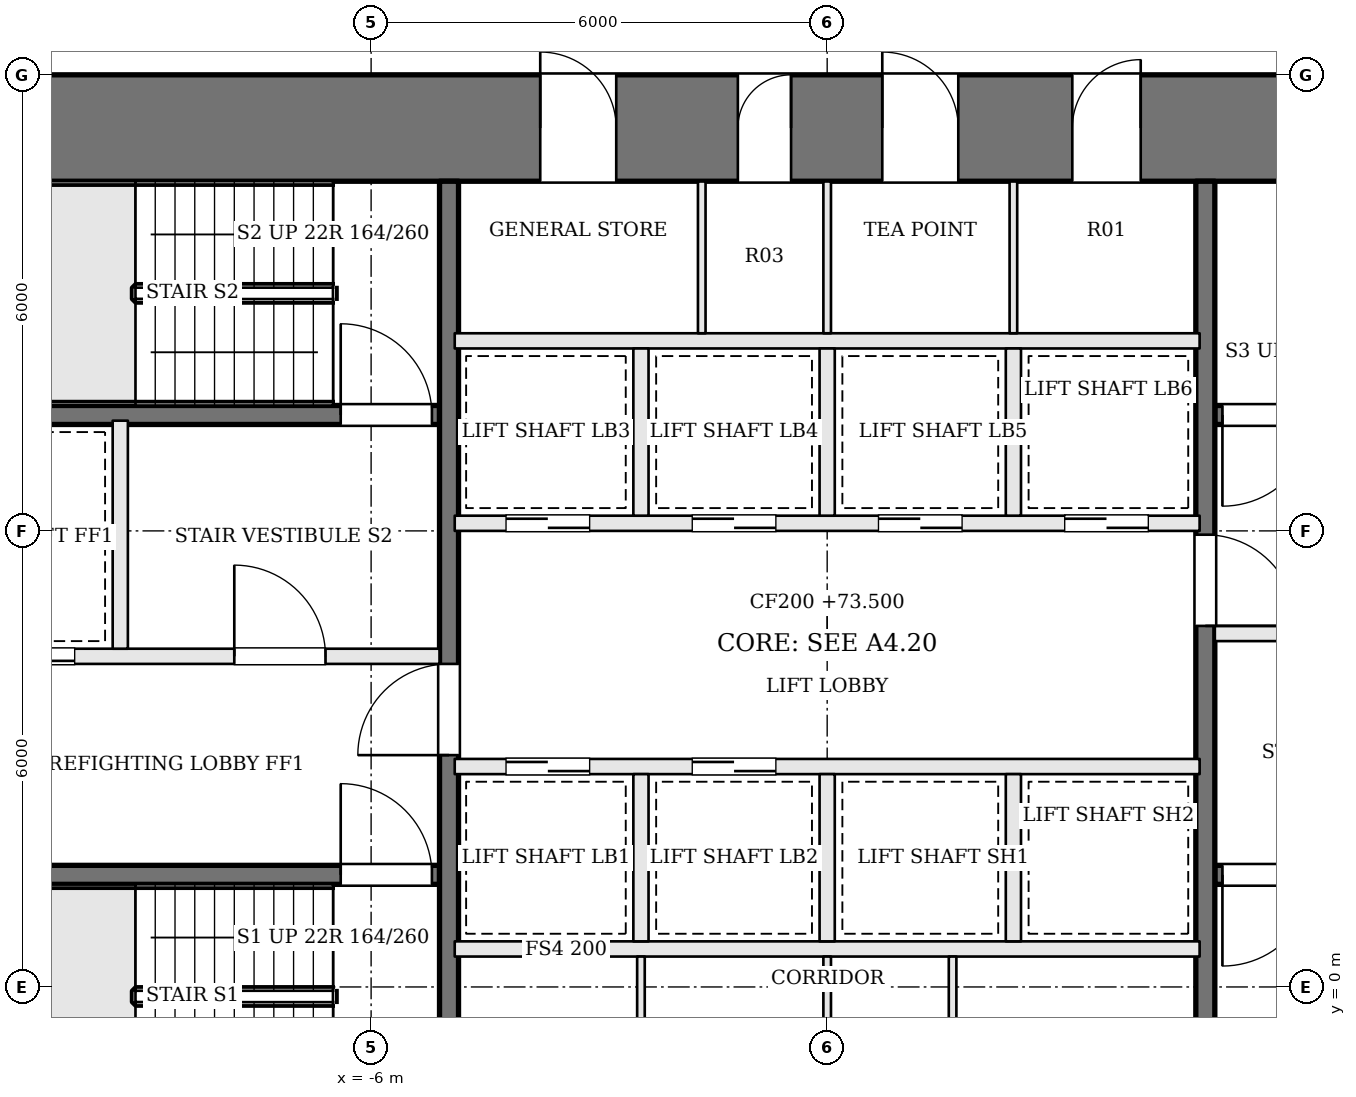
"""IFC4 building model, lengths in metres.
Left out: names, types, materials, properties, quantities, classifications, styles, units other than length and angle.
Written with IfcOpenShell. Run it as: python <this file> out.ifc"""

import sys

from ifc_helpers import new_model, si_unit, direction, frame, frame_2d, origin, place, context, subcontext, project, spatial, rectangle, extrude, element, fill, save


model = new_model("IFC4")
c1 = context("Model", 3, precision=1e-05, world=origin(), true_north=direction((0.0, 1.0)))
c2 = subcontext(c1, "Body", "Model", "MODEL_VIEW")
j1 = project(units=[si_unit("LENGTHUNIT", "METRE"), si_unit("PLANEANGLEUNIT", "RADIAN")], contexts=[c1])
p1 = place(None, origin())
s1 = spatial("IfcSite", under=j1, at=p1, CompositionType="ELEMENT")
p2 = place(p1, origin())
s2 = spatial("IfcBuilding", under=s1, at=p2, CompositionType="ELEMENT")
p3 = place(p2, frame((0.0, 0.0, 73.5)))
s3 = spatial("IfcBuildingStorey", under=s2, at=p3, CompositionType="ELEMENT", Elevation=73.5)
p4 = place(p3, frame((-13.0, 11.3, 0.0), z_axis=(0.0, 0.0, 1.0), x_axis=(1.0, 0.0, 0.0)))
e1 = element("IfcWall", 1, at=p4, inside=s3, PredefinedType="SHEAR", context=c2, shape_type="SweptSolid", body=[
    extrude(rectangle(XDim=26.0, YDim=1.4, at=frame_2d((13.0, 0.0))), origin(), (0.0, 0.0, 1.0), 3.6),
])
p5 = place(p4, frame((9.225, 0.0, 0.0)))
e2 = element("IfcOpeningElement", 2, at=p5, cuts=e1, PredefinedType="OPENING", context=c2, shape_type="SweptSolid", body=[
    extrude(rectangle(XDim=1.0, YDim=2.1, at=frame_2d((0.5, 1.05))), frame((0.0, 0.71, 0.0), z_axis=(0.0, -1.0, 0.0), x_axis=(1.0, 0.0, 0.0)), (0.0, 0.0, 1.0), 1.42),
])
p6 = place(p4, frame((11.825, 0.0, 0.0)))
e3 = element("IfcOpeningElement", 3, at=p6, cuts=e1, PredefinedType="OPENING", context=c2, shape_type="SweptSolid", body=[
    extrude(rectangle(XDim=0.7, YDim=2.1, at=frame_2d((0.35, 1.05))), frame((0.0, 0.71, 0.0), z_axis=(0.0, -1.0, 0.0), x_axis=(1.0, 0.0, 0.0)), (0.0, 0.0, 1.0), 1.42),
])
p7 = place(p4, frame((13.725, 0.0, 0.0)))
e4 = element("IfcOpeningElement", 4, at=p7, cuts=e1, PredefinedType="OPENING", context=c2, shape_type="SweptSolid", body=[
    extrude(rectangle(XDim=1.0, YDim=2.1, at=frame_2d((0.5, 1.05))), frame((0.0, 0.71, 0.0), z_axis=(0.0, -1.0, 0.0), x_axis=(1.0, 0.0, 0.0)), (0.0, 0.0, 1.0), 1.42),
])
p8 = place(p4, frame((16.225, 0.0, 0.0)))
e5 = element("IfcOpeningElement", 5, at=p8, cuts=e1, PredefinedType="OPENING", context=c2, shape_type="SweptSolid", body=[
    extrude(rectangle(XDim=0.9, YDim=2.1, at=frame_2d((0.45, 1.05))), frame((0.0, 0.71, 0.0), z_axis=(0.0, -1.0, 0.0), x_axis=(1.0, 0.0, 0.0)), (0.0, 0.0, 1.0), 1.42),
])
p9 = place(p3, frame((-11.6, 1.475, 0.0), z_axis=(0.0, 0.0, 1.0), x_axis=(1.0, 0.0, 0.0)))
e6 = element("IfcWall", 6, at=p9, inside=s3, PredefinedType="SOLIDWALL", context=c2, shape_type="SweptSolid", body=[
    extrude(rectangle(XDim=6.5, YDim=0.25, at=frame_2d((3.25, 0.0))), origin(), (0.0, 0.0, 1.0), 3.3),
])
p10 = place(p9, frame((5.2, 0.0, 0.0)))
e7 = element("IfcOpeningElement", 7, at=p10, cuts=e6, PredefinedType="OPENING", context=c2, shape_type="SweptSolid", body=[
    extrude(rectangle(XDim=1.2, YDim=2.1, at=frame_2d((0.6, 1.05))), frame((0.0, 0.135, 0.0), z_axis=(0.0, -1.0, 0.0), x_axis=(1.0, 0.0, 0.0)), (0.0, 0.0, 1.0), 0.27),
])
p11 = place(p3, frame((11.6, 7.525, 0.0), z_axis=(0.0, 0.0, 1.0), x_axis=(-1.0, 0.0, 0.0)))
e8 = element("IfcWall", 8, at=p11, inside=s3, PredefinedType="SOLIDWALL", context=c2, shape_type="SweptSolid", body=[
    extrude(rectangle(XDim=6.5, YDim=0.25, at=frame_2d((3.25, 0.0))), origin(), (0.0, 0.0, 1.0), 3.3),
])
p12 = place(p11, frame((5.2, 0.0, 0.0)))
e9 = element("IfcOpeningElement", 9, at=p12, cuts=e8, PredefinedType="OPENING", context=c2, shape_type="SweptSolid", body=[
    extrude(rectangle(XDim=1.2, YDim=2.1, at=frame_2d((0.6, 1.05))), frame((0.0, 0.135, 0.0), z_axis=(0.0, -1.0, 0.0), x_axis=(1.0, 0.0, 0.0)), (0.0, 0.0, 1.0), 0.27),
])
p13 = place(p3, frame((-11.6, 4.35, 0.0), z_axis=(0.0, 0.0, 1.0), x_axis=(1.0, 0.0, 0.0)))
e10 = element("IfcWall", 10, at=p13, inside=s3, PredefinedType="SOLIDWALL", context=c2, shape_type="SweptSolid", body=[
    extrude(rectangle(XDim=6.5, YDim=0.2, at=frame_2d((3.25, 0.0))), origin(), (0.0, 0.0, 1.0), 3.3),
])
p14 = place(p13, frame((3.8, 0.0, 0.0)))
e11 = element("IfcOpeningElement", 11, at=p14, cuts=e10, PredefinedType="OPENING", context=c2, shape_type="SweptSolid", body=[
    extrude(rectangle(XDim=1.2, YDim=2.1, at=frame_2d((0.6, 1.05))), frame((0.0, 0.11, 0.0), z_axis=(0.0, -1.0, 0.0), x_axis=(1.0, 0.0, 0.0)), (0.0, 0.0, 1.0), 0.22),
])
p15 = place(p13, frame((0.5, 0.0, 0.0)))
e12 = element("IfcOpeningElement", 12, at=p15, cuts=e10, PredefinedType="OPENING", context=c2, shape_type="SweptSolid", body=[
    extrude(rectangle(XDim=1.2, YDim=2.1, at=frame_2d((0.6, 1.05))), frame((0.0, 0.11, 0.0), z_axis=(0.0, -1.0, 0.0), x_axis=(1.0, 0.0, 0.0)), (0.0, 0.0, 1.0), 0.22),
])
p16 = place(p3, frame((11.6, 4.65, 0.0), z_axis=(0.0, 0.0, 1.0), x_axis=(-1.0, 0.0, 0.0)))
e13 = element("IfcWall", 13, at=p16, inside=s3, PredefinedType="SOLIDWALL", context=c2, shape_type="SweptSolid", body=[
    extrude(rectangle(XDim=6.5, YDim=0.2, at=frame_2d((3.25, 0.0))), origin(), (0.0, 0.0, 1.0), 3.3),
])
p17 = place(p16, frame((3.8, 0.0, 0.0)))
e14 = element("IfcOpeningElement", 14, at=p17, cuts=e13, PredefinedType="OPENING", context=c2, shape_type="SweptSolid", body=[
    extrude(rectangle(XDim=1.2, YDim=2.1, at=frame_2d((0.6, 1.05))), frame((0.0, 0.11, 0.0), z_axis=(0.0, -1.0, 0.0), x_axis=(1.0, 0.0, 0.0)), (0.0, 0.0, 1.0), 0.22),
])
p18 = place(p16, frame((0.5, 0.0, 0.0)))
e15 = element("IfcOpeningElement", 15, at=p18, cuts=e13, PredefinedType="OPENING", context=c2, shape_type="SweptSolid", body=[
    extrude(rectangle(XDim=1.2, YDim=2.1, at=frame_2d((0.6, 1.05))), frame((0.0, 0.11, 0.0), z_axis=(0.0, -1.0, 0.0), x_axis=(1.0, 0.0, 0.0)), (0.0, 0.0, 1.0), 0.22),
])
p19 = place(p3, frame((-11.6, 7.525, 0.0), z_axis=(0.0, 0.0, 1.0), x_axis=(1.0, 0.0, 0.0)))
e16 = element("IfcWall", 16, at=p19, inside=s3, PredefinedType="SOLIDWALL", context=c2, shape_type="SweptSolid", body=[
    extrude(rectangle(XDim=6.5, YDim=0.25, at=frame_2d((3.25, 0.0))), origin(), (0.0, 0.0, 1.0), 3.3),
])
p20 = place(p19, frame((5.2, 0.0, 0.0)))
e17 = element("IfcOpeningElement", 17, at=p20, cuts=e16, PredefinedType="OPENING", context=c2, shape_type="SweptSolid", body=[
    extrude(rectangle(XDim=1.2, YDim=2.1, at=frame_2d((0.6, 1.05))), frame((0.0, 0.135, 0.0), z_axis=(0.0, -1.0, 0.0), x_axis=(1.0, 0.0, 0.0)), (0.0, 0.0, 1.0), 0.27),
])
p21 = place(p3, frame((11.6, 1.475, 0.0), z_axis=(0.0, 0.0, 1.0), x_axis=(-1.0, 0.0, 0.0)))
e18 = element("IfcWall", 18, at=p21, inside=s3, PredefinedType="SOLIDWALL", context=c2, shape_type="SweptSolid", body=[
    extrude(rectangle(XDim=6.5, YDim=0.25, at=frame_2d((3.25, 0.0))), origin(), (0.0, 0.0, 1.0), 3.3),
])
p22 = place(p21, frame((5.2, 0.0, 0.0)))
e19 = element("IfcOpeningElement", 19, at=p22, cuts=e18, PredefinedType="OPENING", context=c2, shape_type="SweptSolid", body=[
    extrude(rectangle(XDim=1.2, YDim=2.1, at=frame_2d((0.6, 1.05))), frame((0.0, 0.135, 0.0), z_axis=(0.0, -1.0, 0.0), x_axis=(1.0, 0.0, 0.0)), (0.0, 0.0, 1.0), 0.27),
])
p23 = place(p3, frame((-9.3, 4.45, 0.0), z_axis=(0.0, 0.0, 1.0), x_axis=(0.0, 1.0, 0.0)))
e20 = element("IfcWall", 20, at=p23, inside=s3, PredefinedType="SOLIDWALL", context=c2, shape_type="SweptSolid", body=[
    extrude(rectangle(XDim=3.0, YDim=0.2, at=frame_2d((1.5, 0.0))), origin(), (0.0, 0.0, 1.0), 3.3),
])
p24 = place(p3, frame((-4.975, -1.6, 0.0), z_axis=(0.0, 0.0, 1.0), x_axis=(0.0, 1.0, 0.0)))
e21 = element("IfcWall", 21, at=p24, inside=s3, PredefinedType="SOLIDWALL", context=c2, shape_type="SweptSolid", body=[
    extrude(rectangle(XDim=12.2, YDim=0.25, at=frame_2d((6.1, 0.0))), origin(), (0.0, 0.0, 1.0), 3.3),
])
p25 = place(p24, frame((4.65, 0.0, 0.0)))
e22 = element("IfcOpeningElement", 22, at=p25, cuts=e21, PredefinedType="OPENING", context=c2, shape_type="SweptSolid", body=[
    extrude(rectangle(XDim=1.2, YDim=2.1, at=frame_2d((0.6, 1.05))), frame((0.0, 0.135, 0.0), z_axis=(0.0, -1.0, 0.0), x_axis=(1.0, 0.0, 0.0)), (0.0, 0.0, 1.0), 0.27),
])
p26 = place(p3, frame((4.975, 10.6, 0.0), z_axis=(0.0, 0.0, 1.0), x_axis=(0.0, -1.0, 0.0)))
e23 = element("IfcWall", 23, at=p26, inside=s3, PredefinedType="SOLIDWALL", context=c2, shape_type="SweptSolid", body=[
    extrude(rectangle(XDim=12.2, YDim=0.25, at=frame_2d((6.1, 0.0))), origin(), (0.0, 0.0, 1.0), 3.3),
])
p27 = place(p26, frame((4.65, 0.0, 0.0)))
e24 = element("IfcOpeningElement", 24, at=p27, cuts=e23, PredefinedType="OPENING", context=c2, shape_type="SweptSolid", body=[
    extrude(rectangle(XDim=1.2, YDim=2.1, at=frame_2d((0.6, 1.05))), frame((0.0, 0.135, 0.0), z_axis=(0.0, -1.0, 0.0), x_axis=(1.0, 0.0, 0.0)), (0.0, 0.0, 1.0), 0.27),
])
p28 = place(p3, frame((-4.9, 0.5, 0.0), z_axis=(0.0, 0.0, 1.0), x_axis=(1.0, 0.0, 0.0)))
e25 = element("IfcWall", 25, at=p28, inside=s3, PredefinedType="SOLIDWALL", context=c2, shape_type="SweptSolid", body=[
    extrude(rectangle(XDim=9.8, YDim=0.2, at=frame_2d((4.9, 0.0))), origin(), (0.0, 0.0, 1.0), 3.3),
])
p29 = place(p3, frame((-4.9, 2.9, 0.0), z_axis=(0.0, 0.0, 1.0), x_axis=(1.0, 0.0, 0.0)))
e26 = element("IfcWall", 26, at=p29, inside=s3, PredefinedType="SOLIDWALL", context=c2, shape_type="SweptSolid", body=[
    extrude(rectangle(XDim=9.8, YDim=0.2, at=frame_2d((4.9, 0.0))), origin(), (0.0, 0.0, 1.0), 3.3),
])
p30 = place(p29, frame((0.675, 0.0, 0.0)))
e27 = element("IfcOpeningElement", 27, at=p30, cuts=e26, PredefinedType="OPENING", context=c2, shape_type="SweptSolid", body=[
    extrude(rectangle(XDim=1.1, YDim=2.1, at=frame_2d((0.55, 1.05))), frame((0.0, 0.11, 0.0), z_axis=(0.0, -1.0, 0.0), x_axis=(1.0, 0.0, 0.0)), (0.0, 0.0, 1.0), 0.22),
])
p31 = place(p29, frame((3.125, 0.0, 0.0)))
e28 = element("IfcOpeningElement", 28, at=p31, cuts=e26, PredefinedType="OPENING", context=c2, shape_type="SweptSolid", body=[
    extrude(rectangle(XDim=1.1, YDim=2.1, at=frame_2d((0.55, 1.05))), frame((0.0, 0.11, 0.0), z_axis=(0.0, -1.0, 0.0), x_axis=(1.0, 0.0, 0.0)), (0.0, 0.0, 1.0), 0.22),
])
p32 = place(p3, frame((-4.9, 6.1, 0.0), z_axis=(0.0, 0.0, 1.0), x_axis=(1.0, 0.0, 0.0)))
e29 = element("IfcWall", 29, at=p32, inside=s3, PredefinedType="SOLIDWALL", context=c2, shape_type="SweptSolid", body=[
    extrude(rectangle(XDim=9.8, YDim=0.2, at=frame_2d((4.9, 0.0))), origin(), (0.0, 0.0, 1.0), 3.3),
])
p33 = place(p32, frame((0.675, 0.0, 0.0)))
e30 = element("IfcOpeningElement", 30, at=p33, cuts=e29, PredefinedType="OPENING", context=c2, shape_type="SweptSolid", body=[
    extrude(rectangle(XDim=1.1, YDim=2.1, at=frame_2d((0.55, 1.05))), frame((0.0, 0.11, 0.0), z_axis=(0.0, -1.0, 0.0), x_axis=(1.0, 0.0, 0.0)), (0.0, 0.0, 1.0), 0.22),
])
p34 = place(p32, frame((3.125, 0.0, 0.0)))
e31 = element("IfcOpeningElement", 31, at=p34, cuts=e29, PredefinedType="OPENING", context=c2, shape_type="SweptSolid", body=[
    extrude(rectangle(XDim=1.1, YDim=2.1, at=frame_2d((0.55, 1.05))), frame((0.0, 0.11, 0.0), z_axis=(0.0, -1.0, 0.0), x_axis=(1.0, 0.0, 0.0)), (0.0, 0.0, 1.0), 0.22),
])
p35 = place(p32, frame((5.575, 0.0, 0.0)))
e32 = element("IfcOpeningElement", 32, at=p35, cuts=e29, PredefinedType="OPENING", context=c2, shape_type="SweptSolid", body=[
    extrude(rectangle(XDim=1.1, YDim=2.1, at=frame_2d((0.55, 1.05))), frame((0.0, 0.11, 0.0), z_axis=(0.0, -1.0, 0.0), x_axis=(1.0, 0.0, 0.0)), (0.0, 0.0, 1.0), 0.22),
])
p36 = place(p32, frame((8.025, 0.0, 0.0)))
e33 = element("IfcOpeningElement", 33, at=p36, cuts=e29, PredefinedType="OPENING", context=c2, shape_type="SweptSolid", body=[
    extrude(rectangle(XDim=1.1, YDim=2.1, at=frame_2d((0.55, 1.05))), frame((0.0, 0.11, 0.0), z_axis=(0.0, -1.0, 0.0), x_axis=(1.0, 0.0, 0.0)), (0.0, 0.0, 1.0), 0.22),
])
p37 = place(p3, frame((-4.9, 8.5, 0.0), z_axis=(0.0, 0.0, 1.0), x_axis=(1.0, 0.0, 0.0)))
e34 = element("IfcWall", 34, at=p37, inside=s3, PredefinedType="SOLIDWALL", context=c2, shape_type="SweptSolid", body=[
    extrude(rectangle(XDim=9.8, YDim=0.2, at=frame_2d((4.9, 0.0))), origin(), (0.0, 0.0, 1.0), 3.3),
])
for number, where, z_axis, x_axis in (
    (35, (-2.45, 0.6, 0.0), (0.0, 0.0, 1.0), (0.0, 1.0, 0.0)),
    (36, (0.0, 0.6, 0.0), (0.0, 0.0, 1.0), (0.0, 1.0, 0.0)),
    (37, (2.45, 0.6, 0.0), (0.0, 0.0, 1.0), (0.0, 1.0, 0.0)),
    (38, (-2.45, 6.2, 0.0), (0.0, 0.0, 1.0), (0.0, 1.0, 0.0)),
    (39, (0.0, 6.2, 0.0), (0.0, 0.0, 1.0), (0.0, 1.0, 0.0)),
    (40, (2.45, 6.2, 0.0), (0.0, 0.0, 1.0), (0.0, 1.0, 0.0)),
):
    element("IfcWall", number, at=place(p3, frame(where, z_axis=z_axis, x_axis=x_axis)), inside=s3, PredefinedType="SOLIDWALL", context=c2, shape_type="SweptSolid", body=[
        extrude(rectangle(XDim=2.2, YDim=0.2, at=frame_2d((1.1, 0.0))), origin(), (0.0, 0.0, 1.0), 3.3),
    ])
for number, where, z_axis, x_axis in (
    (41, (-2.45, -1.6, 0.0), (0.0, 0.0, 1.0), (0.0, 1.0, 0.0)),
    (42, (0.0, -1.6, 0.0), (0.0, 0.0, 1.0), (0.0, 1.0, 0.0)),
    (43, (1.65, -1.6, 0.0), (0.0, 0.0, 1.0), (0.0, 1.0, 0.0)),
    (44, (-1.65, 8.6, 0.0), (0.0, 0.0, 1.0), (0.0, 1.0, 0.0)),
    (45, (0.0, 8.6, 0.0), (0.0, 0.0, 1.0), (0.0, 1.0, 0.0)),
    (46, (2.45, 8.6, 0.0), (0.0, 0.0, 1.0), (0.0, 1.0, 0.0)),
):
    element("IfcWall", number, at=place(p3, frame(where, z_axis=z_axis, x_axis=x_axis)), inside=s3, PredefinedType="PARTITIONING", context=c2, shape_type="SweptSolid", body=[
        extrude(rectangle(XDim=2.0, YDim=0.1, at=frame_2d((1.0, 0.0))), origin(), (0.0, 0.0, 1.0), 3.3),
    ])
p38 = place(p25, origin())
e47 = element("IfcDoor", 47, at=p38, inside=s3, OperationType="SINGLE_SWING_LEFT", PredefinedType="DOOR", context=c2, shape_type="SweptSolid", body=[
    extrude(rectangle(XDim=1.2, YDim=2.1, at=frame_2d((0.6, 1.05))), frame((0.0, 0.025, 0.0), z_axis=(0.0, -1.0, 0.0), x_axis=(1.0, 0.0, 0.0)), (0.0, 0.0, 1.0), 0.05),
])
fill(e22, e47)
p39 = place(p27, origin())
e48 = element("IfcDoor", 48, at=p39, inside=s3, OperationType="SINGLE_SWING_RIGHT", PredefinedType="DOOR", context=c2, shape_type="SweptSolid", body=[
    extrude(rectangle(XDim=1.2, YDim=2.1, at=frame_2d((0.6, 1.05))), frame((0.0, 0.025, 0.0), z_axis=(0.0, -1.0, 0.0), x_axis=(1.0, 0.0, 0.0)), (0.0, 0.0, 1.0), 0.05),
])
fill(e24, e48)
p40 = place(p14, origin())
e49 = element("IfcDoor", 49, at=p40, inside=s3, OperationType="SINGLE_SWING_LEFT", PredefinedType="DOOR", context=c2, shape_type="SweptSolid", body=[
    extrude(rectangle(XDim=1.2, YDim=2.1, at=frame_2d((0.6, 1.05))), frame((0.0, 0.025, 0.0), z_axis=(0.0, -1.0, 0.0), x_axis=(1.0, 0.0, 0.0)), (0.0, 0.0, 1.0), 0.05),
])
fill(e11, e49)
p41 = place(p10, origin())
e50 = element("IfcDoor", 50, at=p41, inside=s3, OperationType="SINGLE_SWING_LEFT", PredefinedType="DOOR", context=c2, shape_type="SweptSolid", body=[
    extrude(rectangle(XDim=1.2, YDim=2.1, at=frame_2d((0.6, 1.05))), frame((0.0, 0.025, 0.0), z_axis=(0.0, -1.0, 0.0), x_axis=(1.0, 0.0, 0.0)), (0.0, 0.0, 1.0), 0.05),
])
fill(e7, e50)
p42 = place(p12, origin())
e51 = element("IfcDoor", 51, at=p42, inside=s3, OperationType="SINGLE_SWING_RIGHT", PredefinedType="DOOR", context=c2, shape_type="SweptSolid", body=[
    extrude(rectangle(XDim=1.2, YDim=2.1, at=frame_2d((0.6, 1.05))), frame((0.0, 0.025, 0.0), z_axis=(0.0, -1.0, 0.0), x_axis=(1.0, 0.0, 0.0)), (0.0, 0.0, 1.0), 0.05),
])
fill(e9, e51)
p43 = place(p20, origin())
e52 = element("IfcDoor", 52, at=p43, inside=s3, OperationType="SINGLE_SWING_LEFT", PredefinedType="DOOR", context=c2, shape_type="SweptSolid", body=[
    extrude(rectangle(XDim=1.2, YDim=2.1, at=frame_2d((0.6, 1.05))), frame((0.0, 0.025, 0.0), z_axis=(0.0, -1.0, 0.0), x_axis=(1.0, 0.0, 0.0)), (0.0, 0.0, 1.0), 0.05),
])
fill(e17, e52)
p44 = place(p22, origin())
e53 = element("IfcDoor", 53, at=p44, inside=s3, OperationType="SINGLE_SWING_RIGHT", PredefinedType="DOOR", context=c2, shape_type="SweptSolid", body=[
    extrude(rectangle(XDim=1.2, YDim=2.1, at=frame_2d((0.6, 1.05))), frame((0.0, 0.025, 0.0), z_axis=(0.0, -1.0, 0.0), x_axis=(1.0, 0.0, 0.0)), (0.0, 0.0, 1.0), 0.05),
])
fill(e19, e53)
p45 = place(p15, origin())
e54 = element("IfcDoor", 54, at=p45, inside=s3, OperationType="SLIDING_TO_RIGHT", PredefinedType="DOOR", context=c2, shape_type="SweptSolid", body=[
    extrude(rectangle(XDim=1.2, YDim=2.1, at=frame_2d((0.6, 1.05))), frame((0.0, 0.025, 0.0), z_axis=(0.0, -1.0, 0.0), x_axis=(1.0, 0.0, 0.0)), (0.0, 0.0, 1.0), 0.05),
])
fill(e12, e54)
p46 = place(p30, origin())
e55 = element("IfcDoor", 55, at=p46, inside=s3, OperationType="SLIDING_TO_RIGHT", PredefinedType="DOOR", context=c2, shape_type="SweptSolid", body=[
    extrude(rectangle(XDim=1.1, YDim=2.1, at=frame_2d((0.55, 1.05))), frame((0.0, 0.025, 0.0), z_axis=(0.0, -1.0, 0.0), x_axis=(1.0, 0.0, 0.0)), (0.0, 0.0, 1.0), 0.05),
])
fill(e27, e55)
p47 = place(p31, origin())
e56 = element("IfcDoor", 56, at=p47, inside=s3, OperationType="SLIDING_TO_LEFT", PredefinedType="DOOR", context=c2, shape_type="SweptSolid", body=[
    extrude(rectangle(XDim=1.1, YDim=2.1, at=frame_2d((0.55, 1.05))), frame((0.0, 0.025, 0.0), z_axis=(0.0, -1.0, 0.0), x_axis=(1.0, 0.0, 0.0)), (0.0, 0.0, 1.0), 0.05),
])
fill(e28, e56)
p48 = place(p33, origin())
e57 = element("IfcDoor", 57, at=p48, inside=s3, OperationType="SLIDING_TO_RIGHT", PredefinedType="DOOR", context=c2, shape_type="SweptSolid", body=[
    extrude(rectangle(XDim=1.1, YDim=2.1, at=frame_2d((0.55, 1.05))), frame((0.0, 0.025, 0.0), z_axis=(0.0, -1.0, 0.0), x_axis=(1.0, 0.0, 0.0)), (0.0, 0.0, 1.0), 0.05),
])
fill(e30, e57)
p49 = place(p34, origin())
e58 = element("IfcDoor", 58, at=p49, inside=s3, OperationType="SLIDING_TO_LEFT", PredefinedType="DOOR", context=c2, shape_type="SweptSolid", body=[
    extrude(rectangle(XDim=1.1, YDim=2.1, at=frame_2d((0.55, 1.05))), frame((0.0, 0.025, 0.0), z_axis=(0.0, -1.0, 0.0), x_axis=(1.0, 0.0, 0.0)), (0.0, 0.0, 1.0), 0.05),
])
fill(e31, e58)
p50 = place(p35, origin())
e59 = element("IfcDoor", 59, at=p50, inside=s3, OperationType="SLIDING_TO_RIGHT", PredefinedType="DOOR", context=c2, shape_type="SweptSolid", body=[
    extrude(rectangle(XDim=1.1, YDim=2.1, at=frame_2d((0.55, 1.05))), frame((0.0, 0.025, 0.0), z_axis=(0.0, -1.0, 0.0), x_axis=(1.0, 0.0, 0.0)), (0.0, 0.0, 1.0), 0.05),
])
fill(e32, e59)
p51 = place(p36, origin())
e60 = element("IfcDoor", 60, at=p51, inside=s3, OperationType="SLIDING_TO_LEFT", PredefinedType="DOOR", context=c2, shape_type="SweptSolid", body=[
    extrude(rectangle(XDim=1.1, YDim=2.1, at=frame_2d((0.55, 1.05))), frame((0.0, 0.025, 0.0), z_axis=(0.0, -1.0, 0.0), x_axis=(1.0, 0.0, 0.0)), (0.0, 0.0, 1.0), 0.05),
])
fill(e33, e60)
p52 = place(p5, origin())
e61 = element("IfcDoor", 61, at=p52, inside=s3, OperationType="SINGLE_SWING_LEFT", PredefinedType="DOOR", context=c2, shape_type="SweptSolid", body=[
    extrude(rectangle(XDim=1.0, YDim=2.1, at=frame_2d((0.5, 1.05))), frame((0.0, 0.025, 0.0), z_axis=(0.0, -1.0, 0.0), x_axis=(1.0, 0.0, 0.0)), (0.0, 0.0, 1.0), 0.05),
])
fill(e2, e61)
p53 = place(p6, origin())
e62 = element("IfcDoor", 62, at=p53, inside=s3, OperationType="SINGLE_SWING_RIGHT", PredefinedType="DOOR", context=c2, shape_type="SweptSolid", body=[
    extrude(rectangle(XDim=0.7, YDim=2.1, at=frame_2d((0.35, 1.05))), frame((0.0, 0.025, 0.0), z_axis=(0.0, -1.0, 0.0), x_axis=(1.0, 0.0, 0.0)), (0.0, 0.0, 1.0), 0.05),
])
fill(e3, e62)
p54 = place(p7, origin())
e63 = element("IfcDoor", 63, at=p54, inside=s3, OperationType="SINGLE_SWING_LEFT", PredefinedType="DOOR", context=c2, shape_type="SweptSolid", body=[
    extrude(rectangle(XDim=1.0, YDim=2.1, at=frame_2d((0.5, 1.05))), frame((0.0, 0.025, 0.0), z_axis=(0.0, -1.0, 0.0), x_axis=(1.0, 0.0, 0.0)), (0.0, 0.0, 1.0), 0.05),
])
fill(e4, e63)
p55 = place(p8, origin())
e64 = element("IfcDoor", 64, at=p55, inside=s3, OperationType="SINGLE_SWING_RIGHT", PredefinedType="DOOR", context=c2, shape_type="SweptSolid", body=[
    extrude(rectangle(XDim=0.9, YDim=2.1, at=frame_2d((0.45, 1.05))), frame((0.0, 0.025, 0.0), z_axis=(0.0, -1.0, 0.0), x_axis=(1.0, 0.0, 0.0)), (0.0, 0.0, 1.0), 0.05),
])
fill(e5, e64)
save(model, sys.argv[1])
